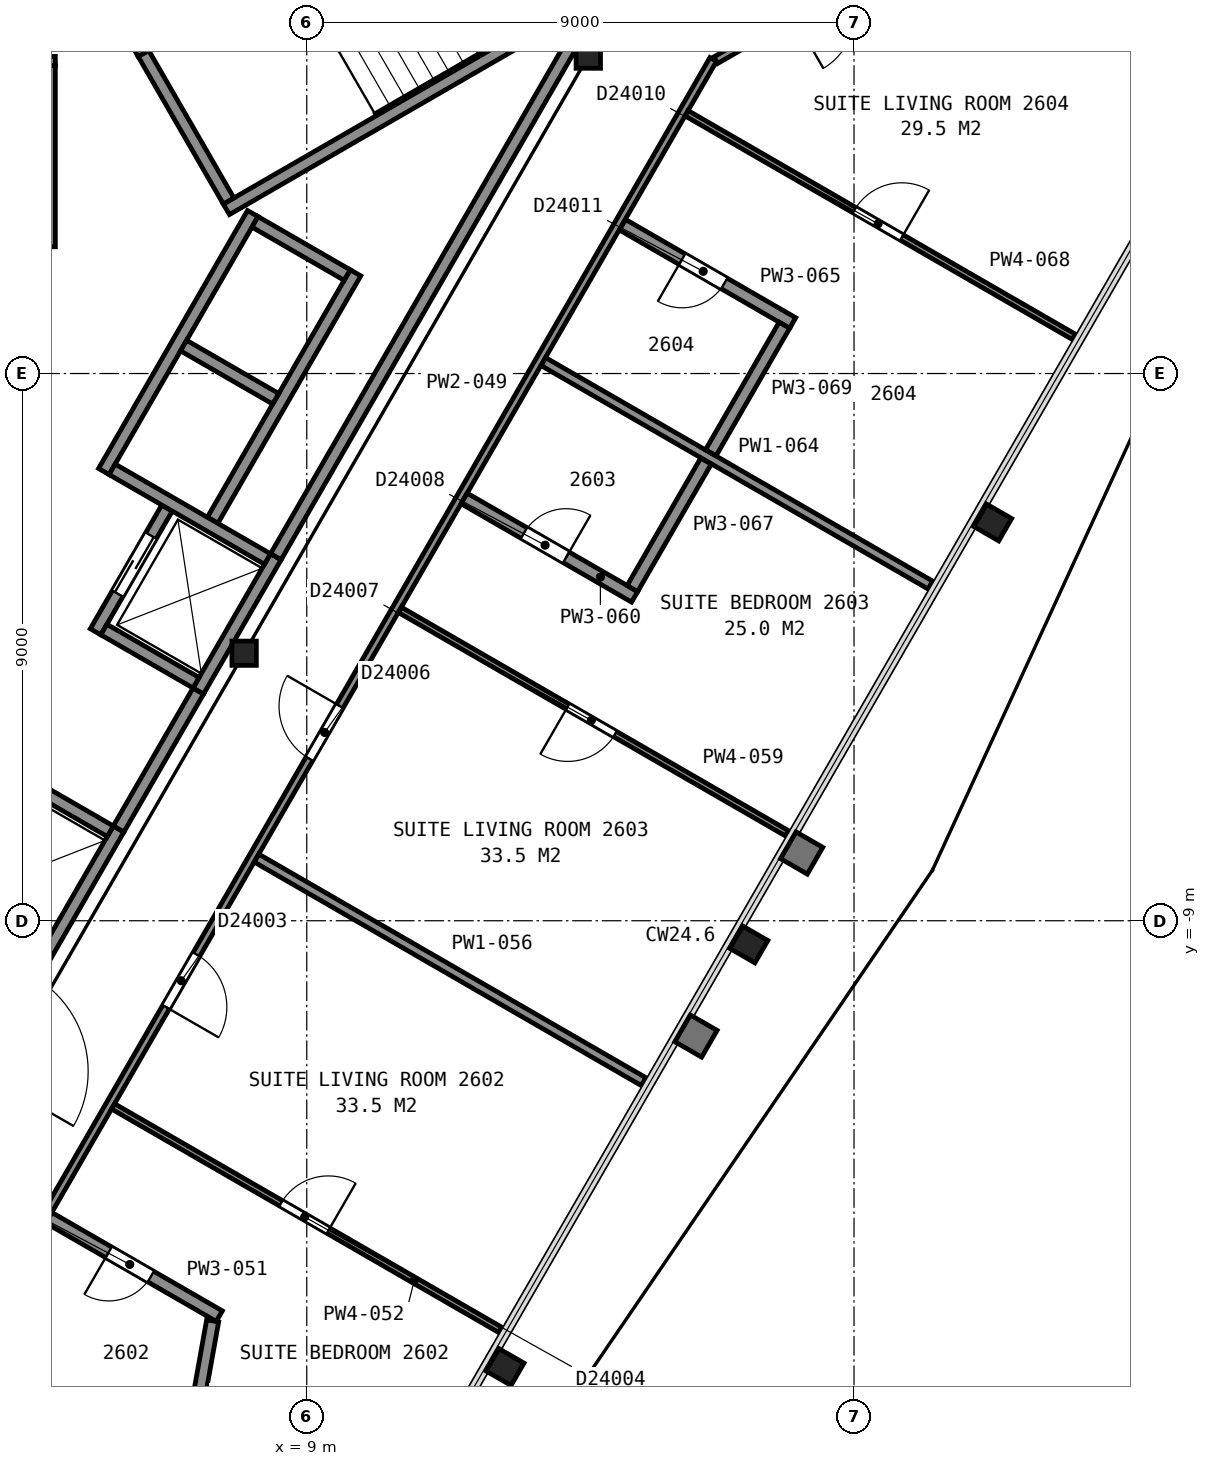
"""IFC4 building model, lengths in metres.
Left out: names, types, materials, properties, quantities, classifications, styles, units other than length and angle.
Written with IfcOpenShell. Run it as: python <this file> out.ifc"""

import sys

from ifc_helpers import new_model, si_unit, direction, frame, frame_2d, origin, origin_2d, place, context, subcontext, project, spatial, rectangle, i_section, extrude, element, fill, save


model = new_model("IFC4")
c1 = context("Model", 3, precision=1e-05, world=origin(), true_north=direction((0.0, 1.0)))
c2 = subcontext(c1, "Body", "Model", "MODEL_VIEW")
j1 = project(units=[si_unit("LENGTHUNIT", "METRE"), si_unit("PLANEANGLEUNIT", "RADIAN")], contexts=[c1])
p1 = place(None, origin())
s1 = spatial("IfcSite", under=j1, at=p1, CompositionType="ELEMENT")
p2 = place(p1, origin())
s2 = spatial("IfcBuilding", under=s1, at=p2, CompositionType="ELEMENT")
p3 = place(p2, frame((0.0, 0.0, 110.8)))
s3 = spatial("IfcBuildingStorey", under=s2, at=p3, CompositionType="ELEMENT", Elevation=110.8)
for number, where, z_axis, x_axis in (
    (1, (12.26, -16.34, 0.0), (0.0, 0.0, 1.0), (-0.5, -0.866, 0.0)),
    (2, (16.27, -9.39, 0.0), (0.0, 0.0, 1.0), (-0.5, -0.866, 0.0)),
    (3, (20.28, -2.45, 0.0), (0.0, 0.0, 1.0), (-0.5, -0.866, 0.0)),
):
    element("IfcColumn", number, at=place(p3, frame(where, z_axis=z_axis, x_axis=x_axis)), inside=s3, PredefinedType="COLUMN", context=c2, shape_type="SweptSolid", body=[
        extrude(i_section(OverallWidth=0.424, OverallDepth=0.475, WebThickness=0.048, FlangeThickness=0.077, FilletRadius=0.015, at=origin_2d()), origin(), (0.0, 0.0, 1.0), 3.6),
    ])
for number, where, z_axis, x_axis in (
    (4, (13.63, 5.22, 0.0), (0.0, 0.0, 1.0), (1.0, 0.0, 0.0)),
    (5, (7.97, -4.6, 0.0), (0.0, 0.0, 1.0), (1.0, 0.0, 0.0)),
):
    element("IfcColumn", number, at=place(p3, frame(where, z_axis=z_axis, x_axis=x_axis)), inside=s3, PredefinedType="COLUMN", context=c2, shape_type="SweptSolid", body=[
        extrude(i_section(OverallWidth=0.401, OverallDepth=0.399, WebThickness=0.025, FlangeThickness=0.04, FilletRadius=0.015, at=origin_2d()), origin(), (0.0, 0.0, 1.0), 3.6),
    ])
for number, where, z_axis, x_axis in (
    (6, (6.178, 5.299, 0.0), (0.0, 0.0, 1.0), (0.866, 0.5, 0.0)),
    (7, (7.678, 2.701, 0.0), (0.0, 0.0, 1.0), (0.866, 0.5, 0.0)),
):
    element("IfcWall", number, at=place(p3, frame(where, z_axis=z_axis, x_axis=x_axis)), inside=s3, PredefinedType="PARTITIONING", context=c2, shape_type="SweptSolid", body=[
        extrude(rectangle(XDim=12.0, YDim=0.2, at=frame_2d((6.0, 0.0))), origin(), (0.0, 0.0, 1.0), 3.35),
    ])
p4 = place(p3, frame((7.715, 2.838, 0.0), z_axis=(0.0, 0.0, 1.0), x_axis=(-0.500049511043, 0.865996816683, 0.0)))
e8 = element("IfcWall", 8, at=p4, inside=s3, PredefinedType="PARTITIONING", context=c2, shape_type="SweptSolid", body=[
    extrude(rectangle(XDim=2.8, YDim=0.2, at=frame_2d((1.4, 0.0))), origin(), (0.0, 0.0, 1.0), 3.35),
])
p5 = place(p3, frame((4.63, -9.7, 0.0), z_axis=(0.0, 0.0, 1.0), x_axis=(0.500062241894, 0.865989465428, 0.0)))
e9 = element("IfcWall", 9, at=p5, inside=s3, PredefinedType="PARTITIONING", context=c2, shape_type="SweptSolid", body=[
    extrude(rectangle(XDim=2.55, YDim=0.2, at=frame_2d((1.275, 0.0))), origin(), (0.0, 0.0, 1.0), 3.6),
])
p6 = place(p3, frame((7.216, -5.222, 0.0), z_axis=(0.0, 0.0, 1.0), x_axis=(0.499990435942, 0.866030925526, 0.0)))
e10 = element("IfcWall", 10, at=p6, inside=s3, PredefinedType="PARTITIONING", context=c2, shape_type="SweptSolid", body=[
    extrude(rectangle(XDim=2.55, YDim=0.2, at=frame_2d((1.275, 0.0))), origin(), (0.0, 0.0, 1.0), 3.6),
])
p7 = place(p3, frame((7.451, -2.414, 0.0), z_axis=(0.0, 0.0, 1.0), x_axis=(0.500016218704, 0.866016039709, 0.0)))
e11 = element("IfcWall", 11, at=p7, inside=s3, PredefinedType="PARTITIONING", context=c2, shape_type="SweptSolid", body=[
    extrude(rectangle(XDim=4.7, YDim=0.2, at=frame_2d((2.35, 0.0))), origin(), (0.0, 0.0, 1.0), 3.6),
])
p8 = place(p3, frame((5.527, -4.247, 0.0), z_axis=(0.0, 0.0, 1.0), x_axis=(0.499938297808, 0.866061024631, 0.0)))
e12 = element("IfcWall", 12, at=p8, inside=s3, PredefinedType="PARTITIONING", context=c2, shape_type="SweptSolid", body=[
    extrude(rectangle(XDim=2.35, YDim=0.2, at=frame_2d((1.175, 0.0))), origin(), (0.0, 0.0, 1.0), 3.6),
])
p9 = place(p8, frame((0.725, 0.0, 0.0)))
e13 = element("IfcOpeningElement", 13, at=p9, cuts=e12, PredefinedType="OPENING", context=c2, shape_type="SweptSolid", body=[
    extrude(rectangle(XDim=1.1, YDim=2.1, at=frame_2d((0.55, 1.05))), frame((0.0, 0.11, 0.0), z_axis=(0.0, -1.0, 0.0), x_axis=(1.0, 0.0, 0.0)), (0.0, 0.0, 1.0), 0.22),
])
p10 = place(p3, frame((5.663, -1.612, 0.0), z_axis=(0.0, 0.0, 1.0), x_axis=(0.49998122708, 0.866036242063, 0.0)))
e14 = element("IfcWall", 14, at=p10, inside=s3, PredefinedType="PARTITIONING", context=c2, shape_type="SweptSolid", body=[
    extrude(rectangle(XDim=4.9, YDim=0.2, at=frame_2d((2.45, 0.0))), origin(), (0.0, 0.0, 1.0), 3.6),
])
p11 = place(p3, frame((9.665, 1.62, 0.0), z_axis=(0.0, 0.0, 1.0), x_axis=(-0.866002029911, 0.500040482552, 0.0)))
e15 = element("IfcWall", 15, at=p11, inside=s3, PredefinedType="PARTITIONING", context=c2, shape_type="SweptSolid", body=[
    extrude(rectangle(XDim=1.75, YDim=0.2, at=frame_2d((0.875, 0.0))), origin(), (0.0, 0.0, 1.0), 3.6),
])
p12 = place(p3, frame((8.49, -0.416, 0.0), z_axis=(0.0, 0.0, 1.0), x_axis=(-0.866036909293, 0.499980071345, 0.0)))
e16 = element("IfcWall", 16, at=p12, inside=s3, PredefinedType="PARTITIONING", context=c2, shape_type="SweptSolid", body=[
    extrude(rectangle(XDim=1.75, YDim=0.2, at=frame_2d((0.875, 0.0))), origin(), (0.0, 0.0, 1.0), 3.6),
])
p13 = place(p3, frame((8.354, -3.051, 0.0), z_axis=(0.0, 0.0, 1.0), x_axis=(-0.866060182126, 0.499939757307, 0.0)))
e17 = element("IfcWall", 17, at=p13, inside=s3, PredefinedType="PARTITIONING", context=c2, shape_type="SweptSolid", body=[
    extrude(rectangle(XDim=2.95, YDim=0.2, at=frame_2d((1.475, 0.0))), origin(), (0.0, 0.0, 1.0), 3.6),
])
p14 = place(p3, frame((7.179, -5.086, 0.0), z_axis=(0.0, 0.0, 1.0), x_axis=(-0.866036909293, 0.499980071345, 0.0)))
e18 = element("IfcWall", 18, at=p14, inside=s3, PredefinedType="PARTITIONING", context=c2, shape_type="SweptSolid", body=[
    extrude(rectangle(XDim=1.75, YDim=0.2, at=frame_2d((0.875, 0.0))), origin(), (0.0, 0.0, 1.0), 3.6),
])
p15 = place(p3, frame((5.769, -7.528, 0.0), z_axis=(0.0, 0.0, 1.0), x_axis=(-0.866002029911, 0.500040482552, 0.0)))
e19 = element("IfcWall", 19, at=p15, inside=s3, PredefinedType="PARTITIONING", context=c2, shape_type="SweptSolid", body=[
    extrude(rectangle(XDim=1.75, YDim=0.2, at=frame_2d((0.875, 0.0))), origin(), (0.0, 0.0, 1.0), 3.6),
])
p16 = place(p3, frame((-0.245, 5.14, 0.0), z_axis=(0.0, 0.0, 1.0), x_axis=(1.0, 0.0, 0.0)))
e20 = element("IfcWall", 20, at=p16, inside=s3, PredefinedType="PARTITIONING", context=c2, shape_type="SweptSolid", body=[
    extrude(rectangle(XDim=5.11, YDim=0.15, at=frame_2d((2.555, 0.0))), origin(), (0.0, 0.0, 1.0), 3.35),
])
p17 = place(p16, frame((1.975, 0.0, 0.0)))
e21 = element("IfcOpeningElement", 21, at=p17, cuts=e20, PredefinedType="OPENING", context=c2, shape_type="SweptSolid", body=[
    extrude(rectangle(XDim=1.0, YDim=2.1, at=frame_2d((0.5, 1.05))), frame((0.0, 0.085, 0.0), z_axis=(0.0, -1.0, 0.0), x_axis=(1.0, 0.0, 0.0)), (0.0, 0.0, 1.0), 0.17),
])
p18 = place(p3, frame((4.79, 2.085, 0.0), z_axis=(0.0, 0.0, 1.0), x_axis=(0.0, 1.0, 0.0)))
e22 = element("IfcWall", 22, at=p18, inside=s3, PredefinedType="PARTITIONING", context=c2, shape_type="SweptSolid", body=[
    extrude(rectangle(XDim=2.98, YDim=0.15, at=frame_2d((1.49, 0.0))), origin(), (0.0, 0.0, 1.0), 3.35),
])
p19 = place(p3, frame((5.906, -7.49, 0.0), z_axis=(0.0, 0.0, 1.0), x_axis=(0.500252727967, 0.865879442048, 0.0)))
e23 = element("IfcWall", 23, at=p19, inside=s3, PredefinedType="PARTITIONING", context=c2, shape_type="SweptSolid", body=[
    extrude(rectangle(XDim=2.617, YDim=0.2, at=frame_2d((1.309, 0.0))), origin(), (0.0, 0.0, 1.0), 3.35),
])
p20 = place(p3, frame((8.492, -3.012, 0.0), z_axis=(0.0, 0.0, 1.0), x_axis=(0.499972957231, 0.866041016371, 0.0)))
e24 = element("IfcWall", 24, at=p20, inside=s3, PredefinedType="PARTITIONING", context=c2, shape_type="SweptSolid", body=[
    extrude(rectangle(XDim=10.349, YDim=0.2, at=frame_2d((5.174, 0.0))), origin(), (0.0, 0.0, 1.0), 3.35),
])
p21 = place(p3, frame((3.887, -16.385, 0.0), z_axis=(0.0, 0.0, 1.0), x_axis=(0.86602133163, -0.500007053112, 0.0)))
e25 = element("IfcWall", 25, at=p21, inside=s3, PredefinedType="PARTITIONING", context=c2, shape_type="SweptSolid", body=[
    extrude(rectangle(XDim=6.856, YDim=0.15, at=frame_2d((3.428, 0.0))), origin(), (0.0, 0.0, 1.0), 2.613),
])
p22 = place(p3, frame((15.684, 5.165, 0.0), z_axis=(0.0, 0.0, 1.0), x_axis=(-0.500027787016, -0.866009360349, 0.0)))
e26 = element("IfcWall", 26, at=p22, inside=s3, PredefinedType="PARTITIONING", context=c2, shape_type="SweptSolid", body=[
    extrude(rectangle(XDim=23.856, YDim=0.125, at=frame_2d((11.928, 0.0))), origin(), (0.0, 0.0, 1.0), 2.613),
])
p23 = place(p22, frame((16.996, 0.0, 0.0)))
e27 = element("IfcOpeningElement", 27, at=p23, cuts=e26, PredefinedType="OPENING", context=c2, shape_type="SweptSolid", body=[
    extrude(rectangle(XDim=1.0, YDim=2.1, at=frame_2d((0.5, 1.05))), frame((0.0, 0.073, 0.0), z_axis=(0.0, -1.0, 0.0), x_axis=(1.0, 0.0, 0.0)), (0.0, 0.0, 1.0), 0.145),
])
p24 = place(p22, frame((12.28, 0.0, 0.0)))
e28 = element("IfcOpeningElement", 28, at=p24, cuts=e26, PredefinedType="OPENING", context=c2, shape_type="SweptSolid", body=[
    extrude(rectangle(XDim=1.0, YDim=2.1, at=frame_2d((0.5, 1.05))), frame((0.0, 0.073, 0.0), z_axis=(0.0, -1.0, 0.0), x_axis=(1.0, 0.0, 0.0)), (0.0, 0.0, 1.0), 0.145),
])
p25 = place(p3, frame((7.562, -15.503, 0.0), z_axis=(0.0, 0.0, 1.0), x_axis=(-0.866078705744, 0.499907666931, 0.0)))
e29 = element("IfcWall", 29, at=p25, inside=s3, PredefinedType="PARTITIONING", context=c2, shape_type="SweptSolid", body=[
    extrude(rectangle(XDim=3.233, YDim=0.2, at=frame_2d((1.616, 0.0))), origin(), (0.0, 0.0, 1.0), 2.613),
])
p26 = place(p25, frame((1.301, 0.0, 0.0)))
e30 = element("IfcOpeningElement", 30, at=p26, cuts=e29, PredefinedType="OPENING", context=c2, shape_type="SweptSolid", body=[
    extrude(rectangle(XDim=0.8, YDim=2.1, at=frame_2d((0.4, 1.05))), frame((0.0, 0.11, 0.0), z_axis=(0.0, -1.0, 0.0), x_axis=(1.0, 0.0, 0.0)), (0.0, 0.0, 1.0), 0.22),
])
p27 = place(p3, frame((12.183, -15.729, 0.0), z_axis=(0.0, 0.0, 1.0), x_axis=(-0.866066702559, 0.499928461601, 0.0)))
e31 = element("IfcWall", 31, at=p27, inside=s3, PredefinedType="PARTITIONING", context=c2, shape_type="SweptSolid", body=[
    extrude(rectangle(XDim=7.352, YDim=0.1, at=frame_2d((3.676, 0.0))), origin(), (0.0, 0.0, 1.0), 2.613),
])
p28 = place(p27, frame((3.265, 0.0, 0.0)))
e32 = element("IfcOpeningElement", 32, at=p28, cuts=e31, PredefinedType="OPENING", context=c2, shape_type="SweptSolid", body=[
    extrude(rectangle(XDim=0.9, YDim=2.1, at=frame_2d((0.45, 1.05))), frame((0.0, 0.06, 0.0), z_axis=(0.0, -1.0, 0.0), x_axis=(1.0, 0.0, 0.0)), (0.0, 0.0, 1.0), 0.12),
])
p29 = place(p3, frame((7.007, -18.06, 0.0), z_axis=(0.0, 0.0, 1.0), x_axis=(0.176615903702, 0.984279849717, 0.0)))
e33 = element("IfcWall", 33, at=p29, inside=s3, PredefinedType="PARTITIONING", context=c2, shape_type="SweptSolid", body=[
    extrude(rectangle(XDim=2.519, YDim=0.2, at=frame_2d((1.259, 0.0))), origin(), (0.0, 0.0, 1.0), 2.613),
])
p30 = place(p3, frame((8.173, -7.969, 0.0), z_axis=(0.0, 0.0, 1.0), x_axis=(0.86596990005, -0.500096122968, 0.0)))
e34 = element("IfcWall", 34, at=p30, inside=s3, PredefinedType="PARTITIONING", context=c2, shape_type="SweptSolid", body=[
    extrude(rectangle(XDim=7.352, YDim=0.15, at=frame_2d((3.676, 0.0))), origin(), (0.0, 0.0, 1.0), 2.613),
])
p31 = place(p3, frame((10.53, -3.886, 0.0), z_axis=(0.0, 0.0, 1.0), x_axis=(0.8660606245, -0.499938990969, 0.0)))
e35 = element("IfcWall", 35, at=p31, inside=s3, PredefinedType="PARTITIONING", context=c2, shape_type="SweptSolid", body=[
    extrude(rectangle(XDim=7.353, YDim=0.1, at=frame_2d((3.676, 0.0))), origin(), (0.0, 0.0, 1.0), 2.613),
])
p32 = place(p31, frame((3.188, 0.0, 0.0)))
e36 = element("IfcOpeningElement", 36, at=p32, cuts=e35, PredefinedType="OPENING", context=c2, shape_type="SweptSolid", body=[
    extrude(rectangle(XDim=0.9, YDim=2.1, at=frame_2d((0.45, 1.05))), frame((0.0, 0.06, 0.0), z_axis=(0.0, -1.0, 0.0), x_axis=(1.0, 0.0, 0.0)), (0.0, 0.0, 1.0), 0.12),
])
p33 = place(p3, frame((11.588, -2.054, 0.0), z_axis=(0.0, 0.0, 1.0), x_axis=(0.865983377851, -0.500072783988, 0.0)))
e37 = element("IfcWall", 37, at=p33, inside=s3, PredefinedType="PARTITIONING", context=c2, shape_type="SweptSolid", body=[
    extrude(rectangle(XDim=3.237, YDim=0.2, at=frame_2d((1.619, 0.0))), origin(), (0.0, 0.0, 1.0), 2.613),
])
p34 = place(p33, frame((1.137, 0.0, 0.0)))
e38 = element("IfcOpeningElement", 38, at=p34, cuts=e37, PredefinedType="OPENING", context=c2, shape_type="SweptSolid", body=[
    extrude(rectangle(XDim=0.8, YDim=2.1, at=frame_2d((0.4, 1.05))), frame((0.0, 0.11, 0.0), z_axis=(0.0, -1.0, 0.0), x_axis=(1.0, 0.0, 0.0)), (0.0, 0.0, 1.0), 0.22),
])
p35 = place(p3, frame((12.893, 0.195, 0.0), z_axis=(0.0, 0.0, 1.0), x_axis=(0.865995225926, -0.500052265941, 0.0)))
e39 = element("IfcWall", 39, at=p35, inside=s3, PredefinedType="PARTITIONING", context=c2, shape_type="SweptSolid", body=[
    extrude(rectangle(XDim=7.347, YDim=0.15, at=frame_2d((3.674, 0.0))), origin(), (0.0, 0.0, 1.0), 2.613),
])
p36 = place(p3, frame((16.992, 0.831, 0.0), z_axis=(0.0, 0.0, 1.0), x_axis=(-0.866022073929, 0.500005767435, 0.0)))
e40 = element("IfcWall", 40, at=p36, inside=s3, PredefinedType="PARTITIONING", context=c2, shape_type="SweptSolid", body=[
    extrude(rectangle(XDim=3.232, YDim=0.2, at=frame_2d((1.616, 0.0))), origin(), (0.0, 0.0, 1.0), 2.613),
])
p37 = place(p36, frame((1.3, 0.0, 0.0)))
e41 = element("IfcOpeningElement", 41, at=p37, cuts=e40, PredefinedType="OPENING", context=c2, shape_type="SweptSolid", body=[
    extrude(rectangle(XDim=0.8, YDim=2.1, at=frame_2d((0.4, 1.05))), frame((0.0, 0.11, 0.0), z_axis=(0.0, -1.0, 0.0), x_axis=(1.0, 0.0, 0.0)), (0.0, 0.0, 1.0), 0.22),
])
p38 = place(p3, frame((14.355, -3.536, 0.0), z_axis=(0.0, 0.0, 1.0), x_axis=(0.50002218001, 0.866012597771, 0.0)))
e42 = element("IfcWall", 42, at=p38, inside=s3, PredefinedType="PARTITIONING", context=c2, shape_type="SweptSolid", body=[
    extrude(rectangle(XDim=2.421, YDim=0.2, at=frame_2d((1.21, 0.0))), origin(), (0.0, 0.0, 1.0), 2.613),
])
p39 = place(p3, frame((21.613, 0.605, 0.0), z_axis=(0.0, 0.0, 1.0), x_axis=(-0.866021344046, 0.500007031608, 0.0)))
e43 = element("IfcWall", 43, at=p39, inside=s3, PredefinedType="PARTITIONING", context=c2, shape_type="SweptSolid", body=[
    extrude(rectangle(XDim=7.352, YDim=0.1, at=frame_2d((3.676, 0.0))), origin(), (0.0, 0.0, 1.0), 2.613),
])
p40 = place(p39, frame((3.264, 0.0, 0.0)))
e44 = element("IfcOpeningElement", 44, at=p40, cuts=e43, PredefinedType="OPENING", context=c2, shape_type="SweptSolid", body=[
    extrude(rectangle(XDim=0.9, YDim=2.1, at=frame_2d((0.45, 1.05))), frame((0.0, 0.06, 0.0), z_axis=(0.0, -1.0, 0.0), x_axis=(1.0, 0.0, 0.0)), (0.0, 0.0, 1.0), 0.12),
])
p41 = place(p3, frame((15.646, -1.302, 0.0), z_axis=(0.0, 0.0, 1.0), x_axis=(0.499719542643, 0.866187265377, 0.0)))
e45 = element("IfcWall", 45, at=p41, inside=s3, PredefinedType="PARTITIONING", context=c2, shape_type="SweptSolid", body=[
    extrude(rectangle(XDim=2.42, YDim=0.2, at=frame_2d((1.21, 0.0))), origin(), (0.0, 0.0, 1.0), 2.613),
])
p42 = place(p3, frame((19.278, 7.204, 0.0), z_axis=(0.0, 0.0, 1.0), x_axis=(-0.865992261418, -0.50005739987, 0.0)))
e46 = element("IfcWall", 46, at=p42, inside=s3, PredefinedType="PARTITIONING", context=c2, shape_type="SweptSolid", body=[
    extrude(rectangle(XDim=4.101, YDim=0.125, at=frame_2d((2.051, 0.0))), origin(), (0.0, 0.0, 1.0), 2.613),
])
p43 = place(p42, frame((1.636, 0.0, 0.0)))
e47 = element("IfcOpeningElement", 47, at=p43, cuts=e46, PredefinedType="OPENING", context=c2, shape_type="SweptSolid", body=[
    extrude(rectangle(XDim=1.0, YDim=2.1, at=frame_2d((0.5, 1.05))), frame((0.0, 0.073, 0.0), z_axis=(0.0, -1.0, 0.0), x_axis=(1.0, 0.0, 0.0)), (0.0, 0.0, 1.0), 0.145),
])
p44 = place(p3, frame((19.889, 7.046, 0.0), z_axis=(0.0, 0.0, 1.0), x_axis=(0.865929380849, -0.500166279733, 0.0)))
e48 = element("IfcWall", 48, at=p44, inside=s3, PredefinedType="PARTITIONING", context=c2, shape_type="SweptSolid", body=[
    extrude(rectangle(XDim=4.714, YDim=0.15, at=frame_2d((2.357, 0.0))), origin(), (0.0, 0.0, 1.0), 2.613),
])
p45 = place(p9, origin())
e49 = element("IfcDoor", 49, at=p45, inside=s3, OperationType="SLIDING_TO_LEFT", PredefinedType="DOOR", context=c2, shape_type="SweptSolid", body=[
    extrude(rectangle(XDim=1.1, YDim=2.1, at=frame_2d((0.55, 1.05))), frame((0.0, 0.025, 0.0), z_axis=(0.0, -1.0, 0.0), x_axis=(1.0, 0.0, 0.0)), (0.0, 0.0, 1.0), 0.05),
])
fill(e13, e49)
p46 = place(p23, origin())
e50 = element("IfcDoor", 50, at=p46, inside=s3, OperationType="SINGLE_SWING_RIGHT", PredefinedType="DOOR", context=c2, shape_type="SweptSolid", body=[
    extrude(rectangle(XDim=1.0, YDim=2.1, at=frame_2d((0.5, 1.05))), frame((0.0, 0.025, 0.0), z_axis=(0.0, -1.0, 0.0), x_axis=(1.0, 0.0, 0.0)), (0.0, 0.0, 1.0), 0.05),
])
fill(e27, e50)
p47 = place(p24, origin())
e51 = element("IfcDoor", 51, at=p47, inside=s3, OperationType="SINGLE_SWING_LEFT", PredefinedType="DOOR", context=c2, shape_type="SweptSolid", body=[
    extrude(rectangle(XDim=1.0, YDim=2.1, at=frame_2d((0.5, 1.05))), frame((0.0, 0.025, 0.0), z_axis=(0.0, -1.0, 0.0), x_axis=(1.0, 0.0, 0.0)), (0.0, 0.0, 1.0), 0.05),
])
fill(e28, e51)
p48 = place(p26, origin())
e52 = element("IfcDoor", 52, at=p48, inside=s3, OperationType="SINGLE_SWING_RIGHT", PredefinedType="DOOR", context=c2, shape_type="SweptSolid", body=[
    extrude(rectangle(XDim=0.8, YDim=2.1, at=frame_2d((0.4, 1.05))), frame((0.0, 0.025, 0.0), z_axis=(0.0, -1.0, 0.0), x_axis=(1.0, 0.0, 0.0)), (0.0, 0.0, 1.0), 0.05),
])
fill(e30, e52)
p49 = place(p28, origin())
e53 = element("IfcDoor", 53, at=p49, inside=s3, OperationType="SINGLE_SWING_LEFT", PredefinedType="DOOR", context=c2, shape_type="SweptSolid", body=[
    extrude(rectangle(XDim=0.9, YDim=2.1, at=frame_2d((0.45, 1.05))), frame((0.0, 0.025, 0.0), z_axis=(0.0, -1.0, 0.0), x_axis=(1.0, 0.0, 0.0)), (0.0, 0.0, 1.0), 0.05),
])
fill(e32, e53)
p50 = place(p32, origin())
e54 = element("IfcDoor", 54, at=p50, inside=s3, OperationType="SINGLE_SWING_LEFT", PredefinedType="DOOR", context=c2, shape_type="SweptSolid", body=[
    extrude(rectangle(XDim=0.9, YDim=2.1, at=frame_2d((0.45, 1.05))), frame((0.0, 0.025, 0.0), z_axis=(0.0, -1.0, 0.0), x_axis=(1.0, 0.0, 0.0)), (0.0, 0.0, 1.0), 0.05),
])
fill(e36, e54)
p51 = place(p34, origin())
e55 = element("IfcDoor", 55, at=p51, inside=s3, OperationType="SINGLE_SWING_RIGHT", PredefinedType="DOOR", context=c2, shape_type="SweptSolid", body=[
    extrude(rectangle(XDim=0.8, YDim=2.1, at=frame_2d((0.4, 1.05))), frame((0.0, 0.025, 0.0), z_axis=(0.0, -1.0, 0.0), x_axis=(1.0, 0.0, 0.0)), (0.0, 0.0, 1.0), 0.05),
])
fill(e38, e55)
p52 = place(p37, origin())
e56 = element("IfcDoor", 56, at=p52, inside=s3, OperationType="SINGLE_SWING_RIGHT", PredefinedType="DOOR", context=c2, shape_type="SweptSolid", body=[
    extrude(rectangle(XDim=0.8, YDim=2.1, at=frame_2d((0.4, 1.05))), frame((0.0, 0.025, 0.0), z_axis=(0.0, -1.0, 0.0), x_axis=(1.0, 0.0, 0.0)), (0.0, 0.0, 1.0), 0.05),
])
fill(e41, e56)
p53 = place(p40, origin())
e57 = element("IfcDoor", 57, at=p53, inside=s3, OperationType="SINGLE_SWING_LEFT", PredefinedType="DOOR", context=c2, shape_type="SweptSolid", body=[
    extrude(rectangle(XDim=0.9, YDim=2.1, at=frame_2d((0.45, 1.05))), frame((0.0, 0.025, 0.0), z_axis=(0.0, -1.0, 0.0), x_axis=(1.0, 0.0, 0.0)), (0.0, 0.0, 1.0), 0.05),
])
fill(e44, e57)
save(model, sys.argv[1])
